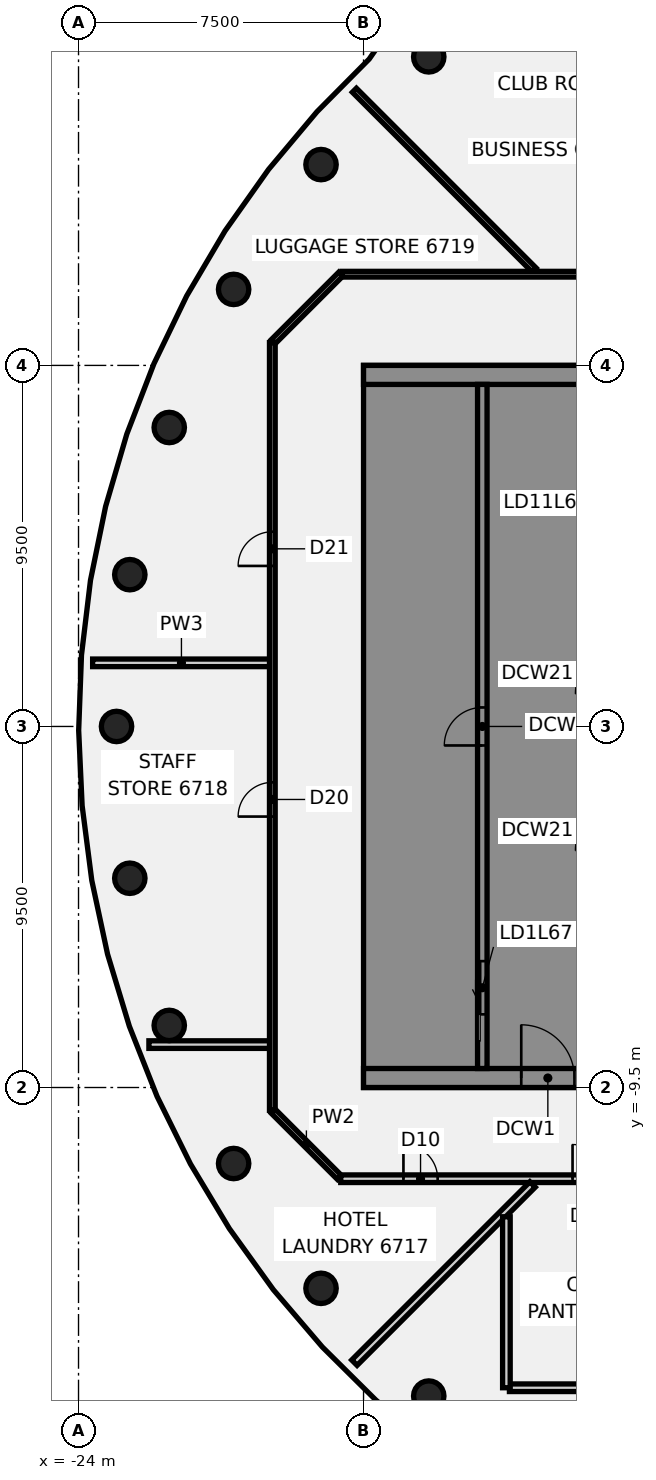
"""IFC4 building model, lengths in metres.
Left out: names, types, materials, properties, quantities, classifications, styles, units other than length and angle.
Written with IfcOpenShell. Run it as: python <this file> out.ifc"""

import sys

from ifc_helpers import new_model, si_unit, direction, frame, frame_2d, origin, origin_2d, place, context, subcontext, project, spatial, polyline, rectangle, circle, outline, extrude, element, fill, save


model = new_model("IFC4")
c1 = context("Model", 3, precision=1e-05, world=origin(), true_north=direction((0.0, 1.0)))
c2 = subcontext(c1, "Body", "Model", "MODEL_VIEW")
j1 = project(units=[si_unit("LENGTHUNIT", "METRE"), si_unit("PLANEANGLEUNIT", "RADIAN")], contexts=[c1])
p1 = place(None, origin())
s1 = spatial("IfcSite", under=j1, at=p1, CompositionType="ELEMENT")
p2 = place(p1, origin())
s2 = spatial("IfcBuilding", under=s1, at=p2, CompositionType="ELEMENT")
p3 = place(p2, frame((0.0, 0.0, 264.0)))
s3 = spatial("IfcBuildingStorey", under=s2, at=p3, CompositionType="ELEMENT", Elevation=264.0)
for number, where, z_axis, x_axis in (
    (1, (-14.784, 17.619, -0.14), (0.0, 0.0, 1.0), (1.0, 0.0, 0.0)),
    (2, (-17.619, 14.784, -0.14), (0.0, 0.0, 1.0), (1.0, 0.0, 0.0)),
    (3, (-19.919, 11.5, -0.14), (0.0, 0.0, 1.0), (1.0, 0.0, 0.0)),
    (4, (-21.613, 7.866, -0.14), (0.0, 0.0, 1.0), (1.0, 0.0, 0.0)),
    (5, (-22.651, 3.994, -0.14), (0.0, 0.0, 1.0), (1.0, 0.0, 0.0)),
    (6, (-23.0, 0.0, -0.14), (0.0, 0.0, 1.0), (1.0, 0.0, 0.0)),
    (7, (-22.651, -3.994, -0.14), (0.0, 0.0, 1.0), (1.0, 0.0, 0.0)),
    (8, (-21.613, -7.866, -0.14), (0.0, 0.0, 1.0), (1.0, 0.0, 0.0)),
    (9, (-19.919, -11.5, -0.14), (0.0, 0.0, 1.0), (1.0, 0.0, 0.0)),
    (10, (-17.619, -14.784, -0.14), (0.0, 0.0, 1.0), (1.0, 0.0, 0.0)),
    (11, (-14.784, -17.619, -0.14), (0.0, 0.0, 1.0), (1.0, 0.0, 0.0)),
):
    element("IfcColumn", number, at=place(p3, frame(where, z_axis=z_axis, x_axis=x_axis)), inside=s3, PredefinedType="COLUMN", context=c2, shape_type="SweptSolid", body=[
        extrude(circle(Radius=0.4, at=origin_2d()), origin(), (0.0, 0.0, 1.0), 3.6),
    ])
p4 = place(p3, frame((-18.872, -10.128, 0.0), z_axis=(0.0, 0.0, 1.0), x_axis=(0.707106781187, -0.707106781187, 0.0)))
e12 = element("IfcWall", 12, at=p4, inside=s3, PredefinedType="PARTITIONING", context=c2, shape_type="SweptSolid", body=[
    extrude(rectangle(XDim=2.455, YDim=0.15, at=frame_2d((1.228, 0.0))), origin(), (0.0, 0.0, 1.0), 2.864),
])
p5 = place(p3, frame((-16.74, 16.74, 0.0), z_axis=(0.0, 0.0, 1.0), x_axis=(0.707106781187, -0.707106781187, 0.0)))
e13 = element("IfcWall", 13, at=p5, inside=s3, PredefinedType="PARTITIONING", context=c2, shape_type="SweptSolid", body=[
    extrude(rectangle(XDim=6.691, YDim=0.15, at=frame_2d((3.345, 0.0))), origin(), (0.0, 0.0, 1.0), 2.864),
])
p6 = place(p3, frame((-15.346, 21.099, 0.0), z_axis=(0.0, 0.0, 1.0), x_axis=(0.896736901725, -0.442564039529, 0.0)))
e14 = element("IfcWall", 14, at=p6, inside=s3, PredefinedType="PARTITIONING", context=c2, shape_type="SweptSolid", body=[
    extrude(rectangle(XDim=20.505, YDim=0.15, at=frame_2d((10.252, 0.0))), origin(), (0.0, 0.0, 1.0), 2.864),
])
p7 = place(p6, frame((13.313, 0.0, 0.0)))
e15 = element("IfcOpeningElement", 15, at=p7, cuts=e14, PredefinedType="OPENING", context=c2, shape_type="SweptSolid", body=[
    extrude(rectangle(XDim=1.8, YDim=2.1, at=frame_2d((0.9, 1.05))), frame((0.0, 0.085, 0.0), z_axis=(0.0, -1.0, 0.0), x_axis=(1.0, 0.0, 0.0)), (0.0, 0.0, 1.0), 0.17),
])
p8 = place(p3, frame((-23.629, 1.674, 0.0), z_axis=(0.0, 0.0, 1.0), x_axis=(1.0, 0.0, 0.0)))
e16 = element("IfcWall", 16, at=p8, inside=s3, PredefinedType="PARTITIONING", context=c2, shape_type="SweptSolid", body=[
    extrude(rectangle(XDim=4.674, YDim=0.2, at=frame_2d((2.337, 0.0))), origin(), (0.0, 0.0, 1.0), 2.864),
])
p9 = place(p3, frame((-22.148, -8.371, 0.0), z_axis=(0.0, 0.0, 1.0), x_axis=(1.0, 0.0, 0.0)))
e17 = element("IfcWall", 17, at=p9, inside=s3, PredefinedType="PARTITIONING", context=c2, shape_type="SweptSolid", body=[
    extrude(rectangle(XDim=3.193, YDim=0.2, at=frame_2d((1.596, 0.0))), origin(), (0.0, 0.0, 1.0), 2.864),
])
p10 = place(p3, frame((-17.1, -11.9, 0.0), z_axis=(0.0, 0.0, 1.0), x_axis=(1.0, 0.0, 0.0)))
e18 = element("IfcWall", 18, at=p10, inside=s3, PredefinedType="PARTITIONING", context=c2, shape_type="SweptSolid", body=[
    extrude(rectangle(XDim=34.165, YDim=0.2, at=frame_2d((17.083, 0.0))), origin(), (0.0, 0.0, 1.0), 2.864),
])
p11 = place(p10, frame((6.1, 0.0, 0.0)))
e19 = element("IfcOpeningElement", 19, at=p11, cuts=e18, PredefinedType="OPENING", context=c2, shape_type="SweptSolid", body=[
    extrude(rectangle(XDim=0.9, YDim=2.1, at=frame_2d((0.45, 1.05))), frame((0.0, 0.11, 0.0), z_axis=(0.0, -1.0, 0.0), x_axis=(1.0, 0.0, 0.0)), (0.0, 0.0, 1.0), 0.22),
])
p12 = place(p10, frame((26.541, 0.0, 0.0)))
e20 = element("IfcOpeningElement", 20, at=p12, cuts=e18, PredefinedType="OPENING", context=c2, shape_type="SweptSolid", body=[
    extrude(rectangle(XDim=1.8, YDim=2.1, at=frame_2d((0.9, 1.05))), frame((0.0, 0.11, 0.0), z_axis=(0.0, -1.0, 0.0), x_axis=(1.0, 0.0, 0.0)), (0.0, 0.0, 1.0), 0.22),
])
p13 = place(p10, frame((17.778, 0.0, 0.0)))
e21 = element("IfcOpeningElement", 21, at=p13, cuts=e18, PredefinedType="OPENING", context=c2, shape_type="SweptSolid", body=[
    extrude(rectangle(XDim=1.8, YDim=2.1, at=frame_2d((0.9, 1.05))), frame((0.0, 0.11, 0.0), z_axis=(0.0, -1.0, 0.0), x_axis=(1.0, 0.0, 0.0)), (0.0, 0.0, 1.0), 0.22),
])
p14 = place(p10, frame((10.359, 0.0, 0.0)))
e22 = element("IfcOpeningElement", 22, at=p14, cuts=e18, PredefinedType="OPENING", context=c2, shape_type="SweptSolid", body=[
    extrude(rectangle(XDim=0.9, YDim=2.1, at=frame_2d((0.45, 1.05))), frame((0.0, 0.11, 0.0), z_axis=(0.0, -1.0, 0.0), x_axis=(1.0, 0.0, 0.0)), (0.0, 0.0, 1.0), 0.22),
])
p15 = place(p10, frame((1.65, 0.0, 0.0)))
e23 = element("IfcOpeningElement", 23, at=p15, cuts=e18, PredefinedType="OPENING", context=c2, shape_type="SweptSolid", body=[
    extrude(rectangle(XDim=0.9, YDim=2.1, at=frame_2d((0.45, 1.05))), frame((0.0, 0.11, 0.0), z_axis=(0.0, -1.0, 0.0), x_axis=(1.0, 0.0, 0.0)), (0.0, 0.0, 1.0), 0.22),
])
p16 = place(p3, frame((-17.065, 11.9, 0.0), z_axis=(0.0, 0.0, 1.0), x_axis=(1.0, 0.0, 0.0)))
e24 = element("IfcWall", 24, at=p16, inside=s3, PredefinedType="PARTITIONING", context=c2, shape_type="SweptSolid", body=[
    extrude(rectangle(XDim=34.165, YDim=0.15, at=frame_2d((17.083, 0.0))), origin(), (0.0, 0.0, 1.0), 2.864),
])
p17 = place(p16, frame((23.057, 0.0, 0.0)))
e25 = element("IfcOpeningElement", 25, at=p17, cuts=e24, PredefinedType="OPENING", context=c2, shape_type="SweptSolid", body=[
    extrude(rectangle(XDim=1.8, YDim=2.1, at=frame_2d((0.9, 1.05))), frame((0.0, 0.085, 0.0), z_axis=(0.0, -1.0, 0.0), x_axis=(1.0, 0.0, 0.0)), (0.0, 0.0, 1.0), 0.17),
])
p18 = place(p16, frame((30.465, 0.0, 0.0)))
e26 = element("IfcOpeningElement", 26, at=p18, cuts=e24, PredefinedType="OPENING", context=c2, shape_type="SweptSolid", body=[
    extrude(rectangle(XDim=0.9, YDim=2.1, at=frame_2d((0.45, 1.05))), frame((0.0, 0.085, 0.0), z_axis=(0.0, -1.0, 0.0), x_axis=(1.0, 0.0, 0.0)), (0.0, 0.0, 1.0), 0.17),
])
p19 = place(p16, frame((11.915, 0.0, 0.0)))
e27 = element("IfcOpeningElement", 27, at=p19, cuts=e24, PredefinedType="OPENING", context=c2, shape_type="SweptSolid", body=[
    extrude(rectangle(XDim=1.8, YDim=2.1, at=frame_2d((0.9, 1.05))), frame((0.0, 0.085, 0.0), z_axis=(0.0, -1.0, 0.0), x_axis=(1.0, 0.0, 0.0)), (0.0, 0.0, 1.0), 0.17),
])
p20 = place(p3, frame((-12.661, -17.4, 0.0), z_axis=(0.0, 0.0, 1.0), x_axis=(1.0, 0.0, 0.0)))
e28 = element("IfcWall", 28, at=p20, inside=s3, PredefinedType="PARTITIONING", context=c2, shape_type="SweptSolid", body=[
    extrude(rectangle(XDim=4.34, YDim=0.2, at=frame_2d((2.17, 0.0))), origin(), (0.0, 0.0, 1.0), 2.864),
])
p21 = place(p3, frame((-18.872, 10.128, 0.0), z_axis=(0.0, 0.0, 1.0), x_axis=(0.707106781187, 0.707106781187, 0.0)))
e29 = element("IfcWall", 29, at=p21, inside=s3, PredefinedType="PARTITIONING", context=c2, shape_type="SweptSolid", body=[
    extrude(rectangle(XDim=2.505, YDim=0.15, at=frame_2d((1.253, 0.0))), origin(), (0.0, 0.0, 1.0), 2.864),
])
p22 = place(p3, frame((-16.74, -16.74, 0.0), z_axis=(0.0, 0.0, 1.0), x_axis=(0.707106781187, 0.707106781187, 0.0)))
e30 = element("IfcWall", 30, at=p22, inside=s3, PredefinedType="PARTITIONING", context=c2, shape_type="SweptSolid", body=[
    extrude(rectangle(XDim=6.631, YDim=0.2, at=frame_2d((3.315, 0.0))), origin(), (0.0, 0.0, 1.0), 2.864),
])
p23 = place(p3, frame((-18.9, -10.1, 0.0), z_axis=(0.0, 0.0, 1.0), x_axis=(0.0, 1.0, 0.0)))
e31 = element("IfcWall", 31, at=p23, inside=s3, PredefinedType="PARTITIONING", context=c2, shape_type="SweptSolid", body=[
    extrude(rectangle(XDim=20.2, YDim=0.15, at=frame_2d((10.1, 0.0))), origin(), (0.0, 0.0, 1.0), 2.864),
])
p24 = place(p23, frame((7.729, 0.0, 0.0)))
e32 = element("IfcOpeningElement", 32, at=p24, cuts=e31, PredefinedType="OPENING", context=c2, shape_type="SweptSolid", body=[
    extrude(rectangle(XDim=0.9, YDim=2.1, at=frame_2d((0.45, 1.05))), frame((0.0, 0.085, 0.0), z_axis=(0.0, -1.0, 0.0), x_axis=(1.0, 0.0, 0.0)), (0.0, 0.0, 1.0), 0.17),
])
p25 = place(p23, frame((14.324, 0.0, 0.0)))
e33 = element("IfcOpeningElement", 33, at=p25, cuts=e31, PredefinedType="OPENING", context=c2, shape_type="SweptSolid", body=[
    extrude(rectangle(XDim=0.9, YDim=2.1, at=frame_2d((0.45, 1.05))), frame((0.0, 0.085, 0.0), z_axis=(0.0, -1.0, 0.0), x_axis=(1.0, 0.0, 0.0)), (0.0, 0.0, 1.0), 0.17),
])
p26 = place(p3, frame((-12.741, -17.4, 0.0), z_axis=(0.0, 0.0, 1.0), x_axis=(0.0, 1.0, 0.0)))
e34 = element("IfcWall", 34, at=p26, inside=s3, PredefinedType="PARTITIONING", context=c2, shape_type="SweptSolid", body=[
    extrude(rectangle(XDim=4.499, YDim=0.2, at=frame_2d((2.25, 0.0))), origin(), (0.0, 0.0, 1.0), 2.864),
])
p27 = place(p3, frame((-16.5, -9.25, 0.0), z_axis=(0.0, 0.0, 1.0), x_axis=(1.0, 0.0, 0.0)))
e35 = element("IfcWall", 35, at=p27, inside=s3, PredefinedType="SHEAR", context=c2, shape_type="SweptSolid", body=[
    extrude(rectangle(XDim=13.0, YDim=0.5, at=frame_2d((6.5, 0.0))), origin(), (0.0, 0.0, 1.0), 3.46),
])
p28 = place(p27, frame((4.15, 0.0, 0.0)))
e36 = element("IfcOpeningElement", 36, at=p28, cuts=e35, PredefinedType="OPENING", context=c2, shape_type="SweptSolid", body=[
    extrude(rectangle(XDim=1.4, YDim=2.1, at=frame_2d((0.7, 1.05))), frame((0.0, 0.26, 0.0), z_axis=(0.0, -1.0, 0.0), x_axis=(1.0, 0.0, 0.0)), (0.0, 0.0, 1.0), 0.52),
])
p29 = place(p27, frame((10.125, 0.0, 0.0)))
e37 = element("IfcOpeningElement", 37, at=p29, cuts=e35, PredefinedType="OPENING", context=c2, shape_type="SweptSolid", body=[
    extrude(rectangle(XDim=1.4, YDim=2.1, at=frame_2d((0.7, 1.05))), frame((0.0, 0.26, 0.0), z_axis=(0.0, -1.0, 0.0), x_axis=(1.0, 0.0, 0.0)), (0.0, 0.0, 1.0), 0.52),
])
p30 = place(p3, origin())
e38 = element("IfcWall", 38, at=p30, inside=s3, PredefinedType="SHEAR", context=c2, shape_type="SweptSolid", body=[
    extrude(outline(polyline([(-13.5, -8.125), (-16.0, -8.125), (-16.0, -5.625), (-13.5, -5.625), (-13.5, -5.375), (-16.0, -5.375), (-16.0, 5.375), (-13.5, 5.375), (-13.5, 5.625), (-16.0, 5.625), (-16.0, 8.125), (-13.5, 8.125), (-13.5, 9.0), (-16.0, 9.0), (-16.5, 9.0), (-16.5, -9.0), (-16.0, -9.0), (-13.5, -9.0), (-13.5, -8.125)])), origin(), (0.0, 0.0, 1.0), 3.46),
])
p31 = place(p3, frame((-16.5, 9.25, 0.0), z_axis=(0.0, 0.0, 1.0), x_axis=(1.0, 0.0, 0.0)))
e39 = element("IfcWall", 39, at=p31, inside=s3, PredefinedType="SHEAR", context=c2, shape_type="SweptSolid", body=[
    extrude(rectangle(XDim=13.0, YDim=0.5, at=frame_2d((6.5, 0.0))), origin(), (0.0, 0.0, 1.0), 3.46),
])
p32 = place(p3, frame((-13.375, -9.0, 0.0), z_axis=(0.0, 0.0, 1.0), x_axis=(0.0, 1.0, 0.0)))
e40 = element("IfcWall", 40, at=p32, inside=s3, PredefinedType="SHEAR", context=c2, shape_type="SweptSolid", body=[
    extrude(rectangle(XDim=18.0, YDim=0.25, at=frame_2d((9.0, 0.0))), origin(), (0.0, 0.0, 1.0), 3.46),
])
p33 = place(p32, frame((1.425, 0.0, 0.0)))
e41 = element("IfcOpeningElement", 41, at=p33, cuts=e40, PredefinedType="OPENING", context=c2, shape_type="SweptSolid", body=[
    extrude(rectangle(XDim=1.4, YDim=2.1, at=frame_2d((0.7, 1.05))), frame((0.0, 0.135, 0.0), z_axis=(0.0, -1.0, 0.0), x_axis=(1.0, 0.0, 0.0)), (0.0, 0.0, 1.0), 0.27),
])
p34 = place(p32, frame((8.5, 0.0, 0.0)))
e42 = element("IfcOpeningElement", 42, at=p34, cuts=e40, PredefinedType="OPENING", context=c2, shape_type="SweptSolid", body=[
    extrude(rectangle(XDim=1.0, YDim=2.1, at=frame_2d((0.5, 1.05))), frame((0.0, 0.135, 0.0), z_axis=(0.0, -1.0, 0.0), x_axis=(1.0, 0.0, 0.0)), (0.0, 0.0, 1.0), 0.27),
])
p35 = place(p11, frame((0.9, 0.0, 0.0), z_axis=(0.0, 0.0, 1.0), x_axis=(-1.0, 0.0, 0.0)))
e43 = element("IfcDoor", 43, at=p35, inside=s3, OperationType="SINGLE_SWING_LEFT", PredefinedType="DOOR", context=c2, shape_type="SweptSolid", body=[
    extrude(rectangle(XDim=0.9, YDim=2.1, at=frame_2d((0.45, 1.05))), frame((0.0, 0.025, 0.0), z_axis=(0.0, -1.0, 0.0), x_axis=(1.0, 0.0, 0.0)), (0.0, 0.0, 1.0), 0.05),
])
fill(e19, e43)
p36 = place(p15, frame((0.9, 0.0, 0.0), z_axis=(0.0, 0.0, 1.0), x_axis=(-1.0, 0.0, 0.0)))
e44 = element("IfcDoor", 44, at=p36, inside=s3, OperationType="SINGLE_SWING_LEFT", PredefinedType="DOOR", context=c2, shape_type="SweptSolid", body=[
    extrude(rectangle(XDim=0.9, YDim=2.1, at=frame_2d((0.45, 1.05))), frame((0.0, 0.025, 0.0), z_axis=(0.0, -1.0, 0.0), x_axis=(1.0, 0.0, 0.0)), (0.0, 0.0, 1.0), 0.05),
])
fill(e23, e44)
p37 = place(p24, origin())
e45 = element("IfcDoor", 45, at=p37, inside=s3, OperationType="SINGLE_SWING_RIGHT", PredefinedType="DOOR", context=c2, shape_type="SweptSolid", body=[
    extrude(rectangle(XDim=0.9, YDim=2.1, at=frame_2d((0.45, 1.05))), frame((0.0, 0.025, 0.0), z_axis=(0.0, -1.0, 0.0), x_axis=(1.0, 0.0, 0.0)), (0.0, 0.0, 1.0), 0.05),
])
fill(e32, e45)
p38 = place(p25, origin())
e46 = element("IfcDoor", 46, at=p38, inside=s3, OperationType="SINGLE_SWING_LEFT", PredefinedType="DOOR", context=c2, shape_type="SweptSolid", body=[
    extrude(rectangle(XDim=0.9, YDim=2.1, at=frame_2d((0.45, 1.05))), frame((0.0, 0.025, 0.0), z_axis=(0.0, -1.0, 0.0), x_axis=(1.0, 0.0, 0.0)), (0.0, 0.0, 1.0), 0.05),
])
fill(e33, e46)
p39 = place(p28, origin())
e47 = element("IfcDoor", 47, at=p39, inside=s3, OperationType="SINGLE_SWING_LEFT", PredefinedType="DOOR", context=c2, shape_type="SweptSolid", body=[
    extrude(rectangle(XDim=1.4, YDim=2.1, at=frame_2d((0.7, 1.05))), frame((0.0, 0.025, 0.0), z_axis=(0.0, -1.0, 0.0), x_axis=(1.0, 0.0, 0.0)), (0.0, 0.0, 1.0), 0.05),
])
fill(e36, e47)
p40 = place(p33, origin())
e48 = element("IfcDoor", 48, at=p40, inside=s3, OperationType="SLIDING_TO_LEFT", PredefinedType="DOOR", context=c2, shape_type="SweptSolid", body=[
    extrude(rectangle(XDim=1.4, YDim=2.1, at=frame_2d((0.7, 1.05))), frame((0.0, 0.025, 0.0), z_axis=(0.0, -1.0, 0.0), x_axis=(1.0, 0.0, 0.0)), (0.0, 0.0, 1.0), 0.05),
])
fill(e41, e48)
p41 = place(p34, origin())
e49 = element("IfcDoor", 49, at=p41, inside=s3, OperationType="SINGLE_SWING_LEFT", PredefinedType="DOOR", context=c2, shape_type="SweptSolid", body=[
    extrude(rectangle(XDim=1.0, YDim=2.1, at=frame_2d((0.5, 1.05))), frame((0.0, 0.025, 0.0), z_axis=(0.0, -1.0, 0.0), x_axis=(1.0, 0.0, 0.0)), (0.0, 0.0, 1.0), 0.05),
])
fill(e42, e49)
save(model, sys.argv[1])
